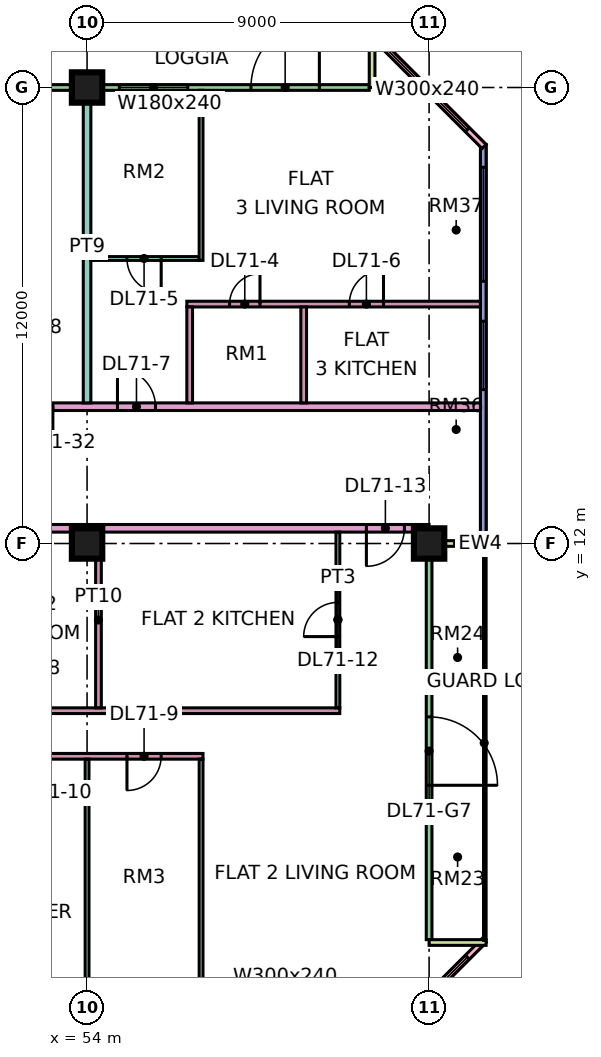
"""IFC4 building model, lengths in metres.
Left out: names, types, materials, properties, quantities, classifications, styles, units other than length and angle.
Written with IfcOpenShell. Run it as: python <this file> out.ifc"""

import sys

from ifc_helpers import new_model, si_unit, direction, frame, frame_2d, origin, origin_2d, place, context, subcontext, project, spatial, rectangle, extrude, element, fill, save


model = new_model("IFC4")
c1 = context("Model", 3, precision=1e-05, world=origin(), true_north=direction((0.0, 1.0)))
c2 = subcontext(c1, "Body", "Model", "MODEL_VIEW")
j1 = project(units=[si_unit("LENGTHUNIT", "METRE"), si_unit("PLANEANGLEUNIT", "RADIAN")], contexts=[c1])
p1 = place(None, origin())
s1 = spatial("IfcSite", under=j1, at=p1, CompositionType="ELEMENT")
p2 = place(p1, origin())
s2 = spatial("IfcBuilding", under=s1, at=p2, CompositionType="ELEMENT")
p3 = place(p2, frame((0.0, 0.0, 303.4)))
s3 = spatial("IfcBuildingStorey", under=s2, at=p3, CompositionType="ELEMENT", Elevation=303.4)
for number, where, z_axis, x_axis in (
    (1, (54.0, 12.0, 0.0), (0.0, 0.0, 1.0), (1.0, 0.0, 0.0)),
    (2, (54.0, 24.0, 0.0), (0.0, 0.0, 1.0), (1.0, 0.0, 0.0)),
    (3, (63.0, 12.0, 0.0), (0.0, 0.0, 1.0), (1.0, 0.0, 0.0)),
):
    element("IfcColumn", number, at=place(p3, frame(where, z_axis=z_axis, x_axis=x_axis)), inside=s3, PredefinedType="COLUMN", context=c2, shape_type="SweptSolid", body=[
        extrude(rectangle(XDim=0.8, YDim=0.8, at=origin_2d()), origin(), (0.0, 0.0, 1.0), 3.75),
    ])
p4 = place(p3, frame((61.425, 24.0, 0.0), z_axis=(0.0, 0.0, 1.0), x_axis=(-1.0, 0.0, 0.0)))
e4 = element("IfcWall", 4, at=p4, inside=s3, PredefinedType="SOLIDWALL", context=c2, shape_type="SweptSolid", body=[
    extrude(rectangle(XDim=13.35, YDim=0.15, at=frame_2d((6.675, 0.0))), origin(), (0.0, 0.0, 1.0), 3.35),
])
p5 = place(p4, frame((1.312, 0.0, 0.0)))
e5 = element("IfcOpeningElement", 5, at=p5, cuts=e4, PredefinedType="OPENING", context=c2, shape_type="SweptSolid", body=[
    extrude(rectangle(XDim=1.8, YDim=2.4, at=frame_2d((0.9, 1.2))), frame((0.0, 0.085, 0.0), z_axis=(0.0, -1.0, 0.0), x_axis=(1.0, 0.0, 0.0)), (0.0, 0.0, 1.0), 0.17),
])
p6 = place(p4, frame((4.775, 0.0, 0.45)))
e6 = element("IfcOpeningElement", 6, at=p6, cuts=e4, PredefinedType="OPENING", context=c2, shape_type="SweptSolid", body=[
    extrude(rectangle(XDim=1.8, YDim=2.4, at=frame_2d((0.9, 1.2))), frame((0.0, 0.085, 0.0), z_axis=(0.0, -1.0, 0.0), x_axis=(1.0, 0.0, 0.0)), (0.0, 0.0, 1.0), 0.17),
])
p7 = place(p4, frame((8.538, 0.0, 0.45)))
e7 = element("IfcOpeningElement", 7, at=p7, cuts=e4, PredefinedType="OPENING", context=c2, shape_type="SweptSolid", body=[
    extrude(rectangle(XDim=4.2, YDim=2.4, at=frame_2d((2.1, 1.2))), frame((0.0, 0.085, 0.0), z_axis=(0.0, -1.0, 0.0), x_axis=(1.0, 0.0, 0.0)), (0.0, 0.0, 1.0), 0.17),
])
p8 = place(p3, frame((61.5, 25.5, 0.0), z_axis=(0.0, 0.0, 1.0), x_axis=(0.0, -1.0, 0.0)))
e8 = element("IfcWall", 8, at=p8, inside=s3, PredefinedType="SOLIDWALL", context=c2, shape_type="SweptSolid", body=[
    extrude(rectangle(XDim=1.5, YDim=0.15, at=frame_2d((0.75, 0.0))), origin(), (0.0, 0.0, 1.0), 3.35),
])
p9 = place(p3, frame((61.447, -1.447, 0.0), z_axis=(0.0, 0.0, 1.0), x_axis=(0.707106781187, 0.707106781187, 0.0)))
e9 = element("IfcWall", 9, at=p9, inside=s3, PredefinedType="SOLIDWALL", context=c2, shape_type="SweptSolid", body=[
    extrude(rectangle(XDim=4.243, YDim=0.15, at=frame_2d((2.121, 0.0))), origin(), (0.0, 0.0, 1.0), 3.35),
])
p10 = place(p9, frame((0.621, 0.0, 0.45)))
e10 = element("IfcOpeningElement", 10, at=p10, cuts=e9, PredefinedType="OPENING", context=c2, shape_type="SweptSolid", body=[
    extrude(rectangle(XDim=3.0, YDim=2.4, at=frame_2d((1.5, 1.2))), frame((0.0, 0.085, 0.0), z_axis=(0.0, -1.0, 0.0), x_axis=(1.0, 0.0, 0.0)), (0.0, 0.0, 1.0), 0.17),
])
p11 = place(p3, frame((63.0, 1.575, 0.0), z_axis=(0.0, 0.0, 1.0), x_axis=(0.0, 1.0, 0.0)))
e11 = element("IfcWall", 11, at=p11, inside=s3, PredefinedType="SOLIDWALL", context=c2, shape_type="SweptSolid", body=[
    extrude(rectangle(XDim=10.35, YDim=0.15, at=frame_2d((5.175, 0.0))), origin(), (0.0, 0.0, 1.0), 3.35),
])
p12 = place(p11, frame((4.062, 0.0, 0.0)))
e12 = element("IfcOpeningElement", 12, at=p12, cuts=e11, PredefinedType="OPENING", context=c2, shape_type="SweptSolid", body=[
    extrude(rectangle(XDim=1.8, YDim=2.4, at=frame_2d((0.9, 1.2))), frame((0.0, 0.085, 0.0), z_axis=(0.0, -1.0, 0.0), x_axis=(1.0, 0.0, 0.0)), (0.0, 0.0, 1.0), 0.17),
])
for number, where, z_axis, x_axis in (
    (13, (64.5, 1.5, 0.0), (0.0, 0.0, 1.0), (-1.0, 0.0, 0.0)),
    (14, (64.5, 12.0, 0.0), (0.0, 0.0, 1.0), (-1.0, 0.0, 0.0)),
):
    element("IfcWall", number, at=place(p3, frame(where, z_axis=z_axis, x_axis=x_axis)), inside=s3, PredefinedType="SOLIDWALL", context=c2, shape_type="SweptSolid", body=[
        extrude(rectangle(XDim=1.5, YDim=0.15, at=frame_2d((0.75, 0.0))), origin(), (0.0, 0.0, 1.0), 3.35),
    ])
p13 = place(p3, frame((64.425, 12.075, 0.0), z_axis=(0.0, 0.0, 1.0), x_axis=(0.0, 1.0, 0.0)))
e15 = element("IfcWall", 15, at=p13, inside=s3, PredefinedType="SOLIDWALL", context=c2, shape_type="SweptSolid", body=[
    extrude(rectangle(XDim=10.425, YDim=0.15, at=frame_2d((5.212, 0.0))), origin(), (0.0, 0.0, 1.0), 3.35),
])
p14 = place(p13, frame((3.975, 0.0, 0.45)))
e16 = element("IfcOpeningElement", 16, at=p14, cuts=e15, PredefinedType="OPENING", context=c2, shape_type="SweptSolid", body=[
    extrude(rectangle(XDim=1.8, YDim=2.4, at=frame_2d((0.9, 1.2))), frame((0.0, 0.085, 0.0), z_axis=(0.0, -1.0, 0.0), x_axis=(1.0, 0.0, 0.0)), (0.0, 0.0, 1.0), 0.17),
])
p15 = place(p13, frame((6.825, 0.0, 0.45)))
e17 = element("IfcOpeningElement", 17, at=p15, cuts=e15, PredefinedType="OPENING", context=c2, shape_type="SweptSolid", body=[
    extrude(rectangle(XDim=3.0, YDim=2.4, at=frame_2d((1.5, 1.2))), frame((0.0, 0.085, 0.0), z_axis=(0.0, -1.0, 0.0), x_axis=(1.0, 0.0, 0.0)), (0.0, 0.0, 1.0), 0.17),
])
p16 = place(p3, frame((64.447, 22.447, 0.0), z_axis=(0.0, 0.0, 1.0), x_axis=(-0.707106781187, 0.707106781187, 0.0)))
e18 = element("IfcWall", 18, at=p16, inside=s3, PredefinedType="SOLIDWALL", context=c2, shape_type="SweptSolid", body=[
    extrude(rectangle(XDim=4.243, YDim=0.15, at=frame_2d((2.121, 0.0))), origin(), (0.0, 0.0, 1.0), 3.35),
])
p17 = place(p16, frame((0.621, 0.0, 0.45)))
e19 = element("IfcOpeningElement", 19, at=p17, cuts=e18, PredefinedType="OPENING", context=c2, shape_type="SweptSolid", body=[
    extrude(rectangle(XDim=3.0, YDim=2.4, at=frame_2d((1.5, 1.2))), frame((0.0, 0.085, 0.0), z_axis=(0.0, -1.0, 0.0), x_axis=(1.0, 0.0, 0.0)), (0.0, 0.0, 1.0), 0.17),
])
p18 = place(p3, frame((40.65, 12.4, 0.0), z_axis=(0.0, 0.0, 1.0), x_axis=(1.0, 0.0, 0.0)))
e20 = element("IfcWall", 20, at=p18, inside=s3, PredefinedType="PARTITIONING", context=c2, shape_type="SweptSolid", body=[
    extrude(rectangle(XDim=22.35, YDim=0.2, at=frame_2d((11.175, 0.0))), origin(), (0.0, 0.0, 1.0), 3.35),
])
p19 = place(p18, frame((20.7, 0.0, 0.0)))
e21 = element("IfcOpeningElement", 21, at=p19, cuts=e20, PredefinedType="OPENING", context=c2, shape_type="SweptSolid", body=[
    extrude(rectangle(XDim=1.0, YDim=2.1, at=frame_2d((0.5, 1.05))), frame((0.0, 0.11, 0.0), z_axis=(0.0, -1.0, 0.0), x_axis=(1.0, 0.0, 0.0)), (0.0, 0.0, 1.0), 0.22),
])
p20 = place(p18, frame((1.05, 0.0, 0.0)))
e22 = element("IfcOpeningElement", 22, at=p20, cuts=e20, PredefinedType="OPENING", context=c2, shape_type="SweptSolid", body=[
    extrude(rectangle(XDim=1.0, YDim=2.1, at=frame_2d((0.5, 1.05))), frame((0.0, 0.11, 0.0), z_axis=(0.0, -1.0, 0.0), x_axis=(1.0, 0.0, 0.0)), (0.0, 0.0, 1.0), 0.22),
])
p21 = place(p3, frame((48.1, 6.4, 0.0), z_axis=(0.0, 0.0, 1.0), x_axis=(1.0, 0.0, 0.0)))
e23 = element("IfcWall", 23, at=p21, inside=s3, PredefinedType="PARTITIONING", context=c2, shape_type="SweptSolid", body=[
    extrude(rectangle(XDim=8.95, YDim=0.15, at=frame_2d((4.475, 0.0))), origin(), (0.0, 0.0, 1.0), 3.35),
])
p22 = place(p21, frame((6.95, 0.0, 0.0)))
e24 = element("IfcOpeningElement", 24, at=p22, cuts=e23, PredefinedType="OPENING", context=c2, shape_type="SweptSolid", body=[
    extrude(rectangle(XDim=0.9, YDim=2.1, at=frame_2d((0.45, 1.05))), frame((0.0, 0.085, 0.0), z_axis=(0.0, -1.0, 0.0), x_axis=(1.0, 0.0, 0.0)), (0.0, 0.0, 1.0), 0.17),
])
p23 = place(p21, frame((3.95, 0.0, 0.0)))
e25 = element("IfcOpeningElement", 25, at=p23, cuts=e23, PredefinedType="OPENING", context=c2, shape_type="SweptSolid", body=[
    extrude(rectangle(XDim=0.9, YDim=2.1, at=frame_2d((0.45, 1.05))), frame((0.0, 0.085, 0.0), z_axis=(0.0, -1.0, 0.0), x_axis=(1.0, 0.0, 0.0)), (0.0, 0.0, 1.0), 0.17),
])
p24 = place(p3, frame((48.1, 7.6, 0.0), z_axis=(0.0, 0.0, 1.0), x_axis=(1.0, 0.0, 0.0)))
e26 = element("IfcWall", 26, at=p24, inside=s3, PredefinedType="PARTITIONING", context=c2, shape_type="SweptSolid", body=[
    extrude(rectangle(XDim=12.55, YDim=0.15, at=frame_2d((6.275, 0.0))), origin(), (0.0, 0.0, 1.0), 3.35),
])
p25 = place(p24, frame((3.9, 0.0, 0.0)))
e27 = element("IfcOpeningElement", 27, at=p25, cuts=e26, PredefinedType="OPENING", context=c2, shape_type="SweptSolid", body=[
    extrude(rectangle(XDim=0.8, YDim=2.1, at=frame_2d((0.4, 1.05))), frame((0.0, 0.085, 0.0), z_axis=(0.0, -1.0, 0.0), x_axis=(1.0, 0.0, 0.0)), (0.0, 0.0, 1.0), 0.17),
])
p26 = place(p24, frame((0.65, 0.0, 0.0)))
e28 = element("IfcOpeningElement", 28, at=p26, cuts=e26, PredefinedType="OPENING", context=c2, shape_type="SweptSolid", body=[
    extrude(rectangle(XDim=0.9, YDim=2.1, at=frame_2d((0.45, 1.05))), frame((0.0, 0.085, 0.0), z_axis=(0.0, -1.0, 0.0), x_axis=(1.0, 0.0, 0.0)), (0.0, 0.0, 1.0), 0.17),
])
p27 = place(p3, frame((51.225, 15.6, 0.0), z_axis=(0.0, 0.0, 1.0), x_axis=(1.0, 0.0, 0.0)))
e29 = element("IfcWall", 29, at=p27, inside=s3, PredefinedType="PARTITIONING", context=c2, shape_type="SweptSolid", body=[
    extrude(rectangle(XDim=13.125, YDim=0.2, at=frame_2d((6.562, 0.0))), origin(), (0.0, 0.0, 1.0), 3.35),
])
p28 = place(p27, frame((3.575, 0.0, 0.0)))
e30 = element("IfcOpeningElement", 30, at=p28, cuts=e29, PredefinedType="OPENING", context=c2, shape_type="SweptSolid", body=[
    extrude(rectangle(XDim=1.0, YDim=2.1, at=frame_2d((0.5, 1.05))), frame((0.0, 0.11, 0.0), z_axis=(0.0, -1.0, 0.0), x_axis=(1.0, 0.0, 0.0)), (0.0, 0.0, 1.0), 0.22),
])
p29 = place(p27, frame((0.875, 0.0, 0.0)))
e31 = element("IfcOpeningElement", 31, at=p29, cuts=e29, PredefinedType="OPENING", context=c2, shape_type="SweptSolid", body=[
    extrude(rectangle(XDim=1.0, YDim=2.1, at=frame_2d((0.5, 1.05))), frame((0.0, 0.11, 0.0), z_axis=(0.0, -1.0, 0.0), x_axis=(1.0, 0.0, 0.0)), (0.0, 0.0, 1.0), 0.22),
])
p30 = place(p3, frame((54.0, 0.074, 0.0), z_axis=(0.0, 0.0, 1.0), x_axis=(0.0, 1.0, 0.0)))
e32 = element("IfcWall", 32, at=p30, inside=s3, PredefinedType="PARTITIONING", context=c2, shape_type="SweptSolid", body=[
    extrude(rectangle(XDim=6.251, YDim=0.1, at=frame_2d((3.125, 0.0))), origin(), (0.0, 0.0, 1.0), 3.35),
])
p31 = place(p3, frame((54.0, 15.7, 0.0), z_axis=(0.0, 0.0, 1.0), x_axis=(0.0, 1.0, 0.0)))
e33 = element("IfcWall", 33, at=p31, inside=s3, PredefinedType="PARTITIONING", context=c2, shape_type="SweptSolid", body=[
    extrude(rectangle(XDim=8.226, YDim=0.2, at=frame_2d((4.113, 0.0))), origin(), (0.0, 0.0, 1.0), 3.35),
])
p32 = place(p3, frame((54.1, 19.5, 0.0), z_axis=(0.0, 0.0, 1.0), x_axis=(1.0, 0.0, 0.0)))
e34 = element("IfcWall", 34, at=p32, inside=s3, PredefinedType="PARTITIONING", context=c2, shape_type="SweptSolid", body=[
    extrude(rectangle(XDim=2.85, YDim=0.1, at=frame_2d((1.425, 0.0))), origin(), (0.0, 0.0, 1.0), 3.35),
])
p33 = place(p32, frame((0.95, 0.0, 0.0)))
e35 = element("IfcOpeningElement", 35, at=p33, cuts=e34, PredefinedType="OPENING", context=c2, shape_type="SweptSolid", body=[
    extrude(rectangle(XDim=0.9, YDim=2.1, at=frame_2d((0.45, 1.05))), frame((0.0, 0.06, 0.0), z_axis=(0.0, -1.0, 0.0), x_axis=(1.0, 0.0, 0.0)), (0.0, 0.0, 1.0), 0.12),
])
p34 = place(p3, frame((54.3, 7.675, 0.0), z_axis=(0.0, 0.0, 1.0), x_axis=(0.0, 1.0, 0.0)))
e36 = element("IfcWall", 36, at=p34, inside=s3, PredefinedType="PARTITIONING", context=c2, shape_type="SweptSolid", body=[
    extrude(rectangle(XDim=4.625, YDim=0.15, at=frame_2d((2.312, 0.0))), origin(), (0.0, 0.0, 1.0), 3.35),
])
p35 = place(p3, frame((56.625, 18.3, 0.0), z_axis=(0.0, 0.0, 1.0), x_axis=(1.0, 0.0, 0.0)))
e37 = element("IfcWall", 37, at=p35, inside=s3, PredefinedType="PARTITIONING", context=c2, shape_type="SweptSolid", body=[
    extrude(rectangle(XDim=7.725, YDim=0.15, at=frame_2d((3.863, 0.0))), origin(), (0.0, 0.0, 1.0), 3.35),
])
p36 = place(p35, frame((1.125, 0.0, 0.0)))
e38 = element("IfcOpeningElement", 38, at=p36, cuts=e37, PredefinedType="OPENING", context=c2, shape_type="SweptSolid", body=[
    extrude(rectangle(XDim=0.8, YDim=2.1, at=frame_2d((0.4, 1.05))), frame((0.0, 0.085, 0.0), z_axis=(0.0, -1.0, 0.0), x_axis=(1.0, 0.0, 0.0)), (0.0, 0.0, 1.0), 0.17),
])
p37 = place(p35, frame((4.275, 0.0, 0.0)))
e39 = element("IfcOpeningElement", 39, at=p37, cuts=e37, PredefinedType="OPENING", context=c2, shape_type="SweptSolid", body=[
    extrude(rectangle(XDim=0.9, YDim=2.1, at=frame_2d((0.45, 1.05))), frame((0.0, 0.085, 0.0), z_axis=(0.0, -1.0, 0.0), x_axis=(1.0, 0.0, 0.0)), (0.0, 0.0, 1.0), 0.17),
])
p38 = place(p3, frame((56.7, 15.7, 0.0), z_axis=(0.0, 0.0, 1.0), x_axis=(0.0, 1.0, 0.0)))
e40 = element("IfcWall", 40, at=p38, inside=s3, PredefinedType="PARTITIONING", context=c2, shape_type="SweptSolid", body=[
    extrude(rectangle(XDim=2.525, YDim=0.15, at=frame_2d((1.263, 0.0))), origin(), (0.0, 0.0, 1.0), 3.35),
])
p39 = place(p3, frame((57.0, 0.074, 0.0), z_axis=(0.0, 0.0, 1.0), x_axis=(0.0, 1.0, 0.0)))
e41 = element("IfcWall", 41, at=p39, inside=s3, PredefinedType="PARTITIONING", context=c2, shape_type="SweptSolid", body=[
    extrude(rectangle(XDim=6.251, YDim=0.1, at=frame_2d((3.125, 0.0))), origin(), (0.0, 0.0, 1.0), 3.35),
])
p40 = place(p3, frame((57.0, 19.45, 0.0), z_axis=(0.0, 0.0, 1.0), x_axis=(0.0, 1.0, 0.0)))
e42 = element("IfcWall", 42, at=p40, inside=s3, PredefinedType="PARTITIONING", context=c2, shape_type="SweptSolid", body=[
    extrude(rectangle(XDim=4.476, YDim=0.1, at=frame_2d((2.238, 0.0))), origin(), (0.0, 0.0, 1.0), 3.35),
])
p41 = place(p3, frame((59.7, 15.7, 0.0), z_axis=(0.0, 0.0, 1.0), x_axis=(0.0, 1.0, 0.0)))
e43 = element("IfcWall", 43, at=p41, inside=s3, PredefinedType="PARTITIONING", context=c2, shape_type="SweptSolid", body=[
    extrude(rectangle(XDim=2.525, YDim=0.15, at=frame_2d((1.263, 0.0))), origin(), (0.0, 0.0, 1.0), 3.35),
])
p42 = place(p3, frame((60.6, 7.675, 0.0), z_axis=(0.0, 0.0, 1.0), x_axis=(0.0, 1.0, 0.0)))
e44 = element("IfcWall", 44, at=p42, inside=s3, PredefinedType="PARTITIONING", context=c2, shape_type="SweptSolid", body=[
    extrude(rectangle(XDim=4.625, YDim=0.1, at=frame_2d((2.312, 0.0))), origin(), (0.0, 0.0, 1.0), 3.35),
])
p43 = place(p42, frame((1.875, 0.0, 0.0)))
e45 = element("IfcOpeningElement", 45, at=p43, cuts=e44, PredefinedType="OPENING", context=c2, shape_type="SweptSolid", body=[
    extrude(rectangle(XDim=0.9, YDim=2.1, at=frame_2d((0.45, 1.05))), frame((0.0, 0.06, 0.0), z_axis=(0.0, -1.0, 0.0), x_axis=(1.0, 0.0, 0.0)), (0.0, 0.0, 1.0), 0.12),
])
p44 = place(p5, frame((1.8, 0.0, 0.0), z_axis=(0.0, 0.0, 1.0), x_axis=(-1.0, 0.0, 0.0)))
e46 = element("IfcDoor", 46, at=p44, inside=s3, OperationType="DOUBLE_DOOR_SINGLE_SWING", PredefinedType="DOOR", context=c2, shape_type="SweptSolid", body=[
    extrude(rectangle(XDim=1.8, YDim=2.4, at=frame_2d((0.9, 1.2))), frame((0.0, 0.025, 0.0), z_axis=(0.0, -1.0, 0.0), x_axis=(1.0, 0.0, 0.0)), (0.0, 0.0, 1.0), 0.05),
])
fill(e5, e46)
p45 = place(p6, origin())
e47 = element("IfcWindow", 47, at=p45, inside=s3, PartitioningType="SINGLE_PANEL", PredefinedType="WINDOW", context=c2, shape_type="SweptSolid", body=[
    extrude(rectangle(XDim=1.8, YDim=2.4, at=frame_2d((0.9, 1.2))), frame((0.0, 0.03, 0.0), z_axis=(0.0, -1.0, 0.0), x_axis=(1.0, 0.0, 0.0)), (0.0, 0.0, 1.0), 0.06),
])
fill(e6, e47)
p46 = place(p10, origin())
e48 = element("IfcWindow", 48, at=p46, inside=s3, PartitioningType="SINGLE_PANEL", PredefinedType="WINDOW", context=c2, shape_type="SweptSolid", body=[
    extrude(rectangle(XDim=3.0, YDim=2.4, at=frame_2d((1.5, 1.2))), frame((0.0, 0.03, 0.0), z_axis=(0.0, -1.0, 0.0), x_axis=(1.0, 0.0, 0.0)), (0.0, 0.0, 1.0), 0.06),
])
fill(e10, e48)
p47 = place(p12, frame((1.8, 0.0, 0.0), z_axis=(0.0, 0.0, 1.0), x_axis=(-1.0, 0.0, 0.0)))
e49 = element("IfcDoor", 49, at=p47, inside=s3, OperationType="DOUBLE_DOOR_SINGLE_SWING", PredefinedType="DOOR", context=c2, shape_type="SweptSolid", body=[
    extrude(rectangle(XDim=1.8, YDim=2.4, at=frame_2d((0.9, 1.2))), frame((0.0, 0.025, 0.0), z_axis=(0.0, -1.0, 0.0), x_axis=(1.0, 0.0, 0.0)), (0.0, 0.0, 1.0), 0.05),
])
fill(e12, e49)
p48 = place(p14, origin())
e50 = element("IfcWindow", 50, at=p48, inside=s3, PartitioningType="SINGLE_PANEL", PredefinedType="WINDOW", context=c2, shape_type="SweptSolid", body=[
    extrude(rectangle(XDim=1.8, YDim=2.4, at=frame_2d((0.9, 1.2))), frame((0.0, 0.03, 0.0), z_axis=(0.0, -1.0, 0.0), x_axis=(1.0, 0.0, 0.0)), (0.0, 0.0, 1.0), 0.06),
])
fill(e16, e50)
p49 = place(p15, origin())
e51 = element("IfcWindow", 51, at=p49, inside=s3, PartitioningType="SINGLE_PANEL", PredefinedType="WINDOW", context=c2, shape_type="SweptSolid", body=[
    extrude(rectangle(XDim=3.0, YDim=2.4, at=frame_2d((1.5, 1.2))), frame((0.0, 0.03, 0.0), z_axis=(0.0, -1.0, 0.0), x_axis=(1.0, 0.0, 0.0)), (0.0, 0.0, 1.0), 0.06),
])
fill(e17, e51)
p50 = place(p17, origin())
e52 = element("IfcWindow", 52, at=p50, inside=s3, PartitioningType="SINGLE_PANEL", PredefinedType="WINDOW", context=c2, shape_type="SweptSolid", body=[
    extrude(rectangle(XDim=3.0, YDim=2.4, at=frame_2d((1.5, 1.2))), frame((0.0, 0.03, 0.0), z_axis=(0.0, -1.0, 0.0), x_axis=(1.0, 0.0, 0.0)), (0.0, 0.0, 1.0), 0.06),
])
fill(e19, e52)
p51 = place(p36, frame((0.8, 0.0, 0.0), z_axis=(0.0, 0.0, 1.0), x_axis=(-1.0, 0.0, 0.0)))
e53 = element("IfcDoor", 53, at=p51, inside=s3, OperationType="SINGLE_SWING_RIGHT", PredefinedType="DOOR", context=c2, shape_type="SweptSolid", body=[
    extrude(rectangle(XDim=0.8, YDim=2.1, at=frame_2d((0.4, 1.05))), frame((0.0, 0.025, 0.0), z_axis=(0.0, -1.0, 0.0), x_axis=(1.0, 0.0, 0.0)), (0.0, 0.0, 1.0), 0.05),
])
fill(e38, e53)
p52 = place(p33, origin())
e54 = element("IfcDoor", 54, at=p52, inside=s3, OperationType="SINGLE_SWING_RIGHT", PredefinedType="DOOR", context=c2, shape_type="SweptSolid", body=[
    extrude(rectangle(XDim=0.9, YDim=2.1, at=frame_2d((0.45, 1.05))), frame((0.0, 0.025, 0.0), z_axis=(0.0, -1.0, 0.0), x_axis=(1.0, 0.0, 0.0)), (0.0, 0.0, 1.0), 0.05),
])
fill(e35, e54)
p53 = place(p37, frame((0.9, 0.0, 0.0), z_axis=(0.0, 0.0, 1.0), x_axis=(-1.0, 0.0, 0.0)))
e55 = element("IfcDoor", 55, at=p53, inside=s3, OperationType="SINGLE_SWING_RIGHT", PredefinedType="DOOR", context=c2, shape_type="SweptSolid", body=[
    extrude(rectangle(XDim=0.9, YDim=2.1, at=frame_2d((0.45, 1.05))), frame((0.0, 0.025, 0.0), z_axis=(0.0, -1.0, 0.0), x_axis=(1.0, 0.0, 0.0)), (0.0, 0.0, 1.0), 0.05),
])
fill(e39, e55)
p54 = place(p28, origin())
e56 = element("IfcDoor", 56, at=p54, inside=s3, OperationType="SINGLE_SWING_LEFT", PredefinedType="DOOR", context=c2, shape_type="SweptSolid", body=[
    extrude(rectangle(XDim=1.0, YDim=2.1, at=frame_2d((0.5, 1.05))), frame((0.0, 0.025, 0.0), z_axis=(0.0, -1.0, 0.0), x_axis=(1.0, 0.0, 0.0)), (0.0, 0.0, 1.0), 0.05),
])
fill(e30, e56)
p55 = place(p22, frame((0.9, 0.0, 0.0), z_axis=(0.0, 0.0, 1.0), x_axis=(-1.0, 0.0, 0.0)))
e57 = element("IfcDoor", 57, at=p55, inside=s3, OperationType="SINGLE_SWING_LEFT", PredefinedType="DOOR", context=c2, shape_type="SweptSolid", body=[
    extrude(rectangle(XDim=0.9, YDim=2.1, at=frame_2d((0.45, 1.05))), frame((0.0, 0.025, 0.0), z_axis=(0.0, -1.0, 0.0), x_axis=(1.0, 0.0, 0.0)), (0.0, 0.0, 1.0), 0.05),
])
fill(e24, e57)
p56 = place(p43, origin())
e58 = element("IfcDoor", 58, at=p56, inside=s3, OperationType="SINGLE_SWING_LEFT", PredefinedType="DOOR", context=c2, shape_type="SweptSolid", body=[
    extrude(rectangle(XDim=0.9, YDim=2.1, at=frame_2d((0.45, 1.05))), frame((0.0, 0.025, 0.0), z_axis=(0.0, -1.0, 0.0), x_axis=(1.0, 0.0, 0.0)), (0.0, 0.0, 1.0), 0.05),
])
fill(e45, e58)
p57 = place(p19, frame((1.0, 0.0, 0.0), z_axis=(0.0, 0.0, 1.0), x_axis=(-1.0, 0.0, 0.0)))
e59 = element("IfcDoor", 59, at=p57, inside=s3, OperationType="SINGLE_SWING_LEFT", PredefinedType="DOOR", context=c2, shape_type="SweptSolid", body=[
    extrude(rectangle(XDim=1.0, YDim=2.1, at=frame_2d((0.5, 1.05))), frame((0.0, 0.025, 0.0), z_axis=(0.0, -1.0, 0.0), x_axis=(1.0, 0.0, 0.0)), (0.0, 0.0, 1.0), 0.05),
])
fill(e21, e59)
p58 = place(p29, origin())
e60 = element("IfcDoor", 60, at=p58, inside=s3, OperationType="SINGLE_SWING_RIGHT", PredefinedType="DOOR", context=c2, shape_type="SweptSolid", body=[
    extrude(rectangle(XDim=1.0, YDim=2.1, at=frame_2d((0.5, 1.05))), frame((0.0, 0.025, 0.0), z_axis=(0.0, -1.0, 0.0), x_axis=(1.0, 0.0, 0.0)), (0.0, 0.0, 1.0), 0.05),
])
fill(e31, e60)
save(model, sys.argv[1])
